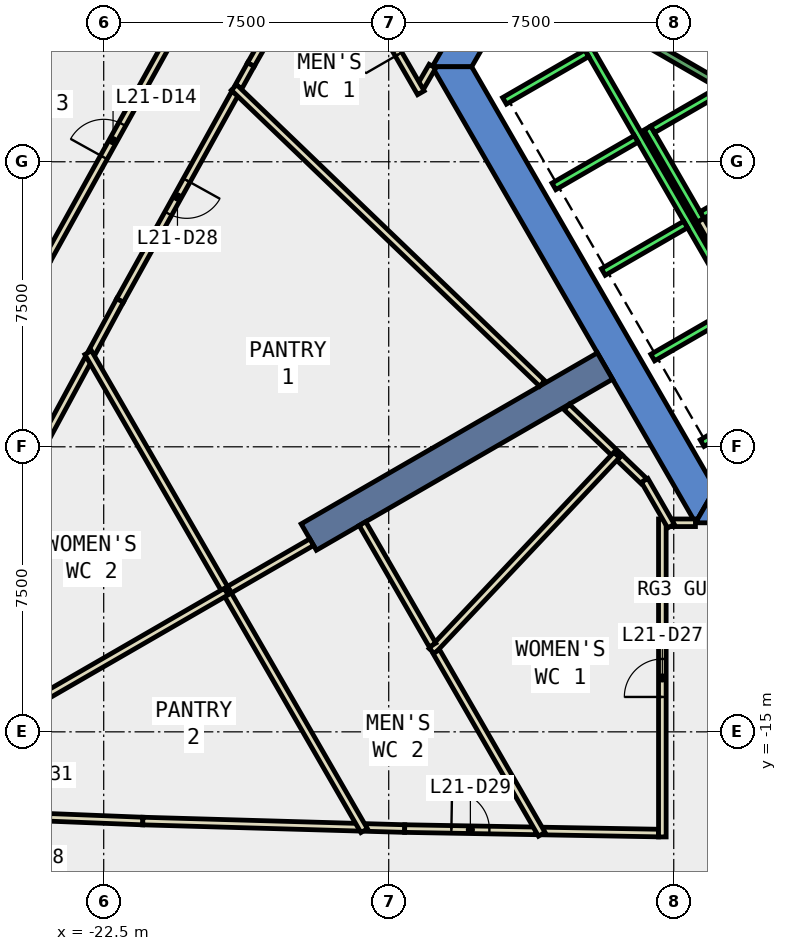
"""IFC4 building model, lengths in metres.
Left out: names, types, materials, properties, quantities, classifications, styles, units other than length and angle.
Written with IfcOpenShell. Run it as: python <this file> out.ifc"""

import sys

from ifc_helpers import new_model, si_unit, direction, frame, frame_2d, origin, place, context, subcontext, project, spatial, polyline, rectangle, outline, extrude, element, fill, save


model = new_model("IFC4")
c1 = context("Model", 3, precision=1e-05, world=origin(), true_north=direction((0.0, 1.0)))
c2 = subcontext(c1, "Body", "Model", "MODEL_VIEW")
j1 = project(units=[si_unit("LENGTHUNIT", "METRE"), si_unit("PLANEANGLEUNIT", "RADIAN")], contexts=[c1])
p1 = place(None, origin())
s1 = spatial("IfcSite", under=j1, at=p1, CompositionType="ELEMENT")
p2 = place(p1, origin())
s2 = spatial("IfcBuilding", under=s1, at=p2, CompositionType="ELEMENT")
p3 = place(p2, frame((0.0, 0.0, 99.2)))
s3 = spatial("IfcBuildingStorey", under=s2, at=p3, CompositionType="ELEMENT", Elevation=99.2)
p4 = place(p3, frame((0.0, 0.0, -0.4)))
e1 = element("IfcWall", 1, at=p4, inside=s3, PredefinedType="SHEAR", context=c2, shape_type="SweptSolid", body=[
    extrude(outline(polyline([(-12.488, 3.07), (-13.267, 3.52), (-13.856, 2.5), (-12.817, 2.5), (-12.488, 3.07)])), origin(), (0.0, 0.0, 1.0), 4.2),
])
p5 = place(p3, frame((0.0, 0.0, -0.4)))
e2 = element("IfcWall", 2, at=p5, inside=s3, PredefinedType="SHEAR", context=c2, shape_type="SweptSolid", body=[
    extrude(outline(polyline([(-13.856, 2.5), (-6.928, -9.5), (-6.409, -8.6), (-12.817, 2.5), (-13.856, 2.5)])), origin(), (0.0, 0.0, 1.0), 4.2),
])
p6 = place(p3, frame((0.0, 0.0, -0.4)))
e3 = element("IfcWall", 3, at=p6, inside=s3, PredefinedType="SHEAR", context=c2, shape_type="SweptSolid", body=[
    extrude(outline(polyline([(3.75, -9.5), (3.75, -8.6), (-6.409, -8.6), (-6.928, -9.5), (3.75, -9.5)])), origin(), (0.0, 0.0, 1.0), 4.2),
])
p7 = place(p3, frame((-9.31, -5.375, -0.4), z_axis=(0.0, 0.0, 1.0), x_axis=(-0.866017533419, -0.500013631625, 0.0)))
e4 = element("IfcWall", 4, at=p7, inside=s3, PredefinedType="SHEAR", context=c2, shape_type="SweptSolid", body=[
    extrude(rectangle(XDim=9.0, YDim=0.8, at=frame_2d((4.5, 0.0))), origin(), (0.0, 0.0, 1.0), 4.2),
])
p8 = place(p3, frame((-13.85, 2.514, 0.0), z_axis=(0.0, 0.0, 1.0), x_axis=(-0.500418219013, -0.865783810244, 0.0)))
e5 = element("IfcWall", 5, at=p8, inside=s3, PredefinedType="PARTITIONING", context=c2, shape_type="SweptSolid", body=[
    extrude(rectangle(XDim=0.607, YDim=0.2, at=frame_2d((0.304, 0.0))), origin(), (0.0, 0.0, 1.0), 3.8),
])
p9 = place(p3, frame((-14.154, 1.815, 0.0), z_axis=(0.0, 0.0, 1.0), x_axis=(-0.500038857296, 0.866002968352, 0.0)))
e6 = element("IfcWall", 6, at=p9, inside=s3, PredefinedType="PARTITIONING", context=c2, shape_type="SweptSolid", body=[
    extrude(rectangle(XDim=3.34, YDim=0.2, at=frame_2d((1.67, 0.0))), origin(), (0.0, 0.0, 1.0), 3.8),
])
p10 = place(p9, frame((1.17, 0.0, 0.0)))
e7 = element("IfcOpeningElement", 7, at=p10, cuts=e6, PredefinedType="OPENING", context=c2, shape_type="SweptSolid", body=[
    extrude(rectangle(XDim=1.0, YDim=2.1, at=frame_2d((0.5, 1.05))), frame((0.0, 0.11, 0.0), z_axis=(0.0, -1.0, 0.0), x_axis=(1.0, 0.0, 0.0)), (0.0, 0.0, 1.0), 0.22),
])
p11 = place(p3, frame((-16.986, 5.436, 0.0), z_axis=(0.0, 0.0, 1.0), x_axis=(-0.49514688151, -0.868809280412, 0.0)))
e8 = element("IfcWall", 8, at=p11, inside=s3, PredefinedType="PARTITIONING", context=c2, shape_type="SweptSolid", body=[
    extrude(rectangle(XDim=3.314, YDim=0.2, at=frame_2d((1.657, 0.0))), origin(), (0.0, 0.0, 1.0), 3.8),
])
p12 = place(p3, frame((-18.627, 2.557, 0.0), z_axis=(0.0, 0.0, 1.0), x_axis=(-0.484771582084, -0.874640790956, 0.0)))
e9 = element("IfcWall", 9, at=p12, inside=s3, PredefinedType="PARTITIONING", context=c2, shape_type="SweptSolid", body=[
    extrude(rectangle(XDim=0.666, YDim=0.2, at=frame_2d((0.333, 0.0))), origin(), (0.0, 0.0, 1.0), 3.8),
])
p13 = place(p3, frame((-10.923, -17.61, 0.0), z_axis=(0.0, 0.0, 1.0), x_axis=(0.999846489632, -0.017521334753, 0.0)))
e10 = element("IfcWall", 10, at=p13, inside=s3, PredefinedType="PARTITIONING", context=c2, shape_type="SweptSolid", body=[
    extrude(rectangle(XDim=3.024, YDim=0.2, at=frame_2d((1.512, 0.0))), origin(), (0.0, 0.0, 1.0), 3.8),
])
p14 = place(p3, frame((-19.047, 1.799, 0.0), z_axis=(0.0, 0.0, 1.0), x_axis=(-0.485240396382, -0.87438078531, 0.0)))
e11 = element("IfcWall", 11, at=p14, inside=s3, PredefinedType="PARTITIONING", context=c2, shape_type="SweptSolid", body=[
    extrude(rectangle(XDim=6.232, YDim=0.2, at=frame_2d((3.116, 0.0))), origin(), (0.0, 0.0, 1.0), 3.8),
])
p15 = place(p14, frame((2.616, 0.0, 0.0)))
e12 = element("IfcOpeningElement", 12, at=p15, cuts=e11, PredefinedType="OPENING", context=c2, shape_type="SweptSolid", body=[
    extrude(rectangle(XDim=1.0, YDim=2.1, at=frame_2d((0.5, 1.05))), frame((0.0, 0.11, 0.0), z_axis=(0.0, -1.0, 0.0), x_axis=(1.0, 0.0, 0.0)), (0.0, 0.0, 1.0), 0.22),
])
p16 = place(p3, frame((-22.071, -3.65, 0.0), z_axis=(0.0, 0.0, 1.0), x_axis=(-0.475212034938, -0.879871309823, 0.0)))
e13 = element("IfcWall", 13, at=p16, inside=s3, PredefinedType="PARTITIONING", context=c2, shape_type="SweptSolid", body=[
    extrude(rectangle(XDim=1.557, YDim=0.2, at=frame_2d((0.779, 0.0))), origin(), (0.0, 0.0, 1.0), 3.8),
])
p17 = place(p3, frame((-15.596, -17.516, 0.0), z_axis=(0.0, 0.0, 1.0), x_axis=(0.99959813819, -0.028347171427, 0.0)))
e14 = element("IfcWall", 14, at=p17, inside=s3, PredefinedType="PARTITIONING", context=c2, shape_type="SweptSolid", body=[
    extrude(rectangle(XDim=1.016, YDim=0.2, at=frame_2d((0.508, 0.0))), origin(), (0.0, 0.0, 1.0), 3.8),
])
p18 = place(p3, frame((-14.58, -17.545, 0.0), z_axis=(0.0, 0.0, 1.0), x_axis=(0.999844180431, -0.01765261618, 0.0)))
e15 = element("IfcWall", 15, at=p18, inside=s3, PredefinedType="PARTITIONING", context=c2, shape_type="SweptSolid", body=[
    extrude(rectangle(XDim=3.458, YDim=0.2, at=frame_2d((1.729, 0.0))), origin(), (0.0, 0.0, 1.0), 3.8),
])
p19 = place(p18, frame((1.229, 0.0, 0.0)))
e16 = element("IfcOpeningElement", 16, at=p19, cuts=e15, PredefinedType="OPENING", context=c2, shape_type="SweptSolid", body=[
    extrude(rectangle(XDim=1.0, YDim=2.1, at=frame_2d((0.5, 1.05))), frame((0.0, 0.11, 0.0), z_axis=(0.0, -1.0, 0.0), x_axis=(1.0, 0.0, 0.0)), (0.0, 0.0, 1.0), 0.22),
])
p20 = place(p3, frame((-22.906, -5.196, 0.0), z_axis=(0.0, 0.0, 1.0), x_axis=(-0.475448213767, -0.879743710421, 0.0)))
e17 = element("IfcWall", 17, at=p20, inside=s3, PredefinedType="PARTITIONING", context=c2, shape_type="SweptSolid", body=[
    extrude(rectangle(XDim=5.343, YDim=0.2, at=frame_2d((2.671, 0.0))), origin(), (0.0, 0.0, 1.0), 3.8),
])
p21 = place(p3, frame((-27.307, -17.116, 0.0), z_axis=(0.0, 0.0, 1.0), x_axis=(0.999217829656, -0.039544012168, 0.0)))
e18 = element("IfcWall", 18, at=p21, inside=s3, PredefinedType="PARTITIONING", context=c2, shape_type="SweptSolid", body=[
    extrude(rectangle(XDim=5.841, YDim=0.2, at=frame_2d((2.92, 0.0))), origin(), (0.0, 0.0, 1.0), 3.8),
])
p22 = place(p21, frame((2.42, 0.0, 0.0)))
e19 = element("IfcOpeningElement", 19, at=p22, cuts=e18, PredefinedType="OPENING", context=c2, shape_type="SweptSolid", body=[
    extrude(rectangle(XDim=1.0, YDim=2.1, at=frame_2d((0.5, 1.05))), frame((0.0, 0.11, 0.0), z_axis=(0.0, -1.0, 0.0), x_axis=(1.0, 0.0, 0.0)), (0.0, 0.0, 1.0), 0.22),
])
p23 = place(p3, frame((-21.471, -17.347, 0.0), z_axis=(0.0, 0.0, 1.0), x_axis=(0.999587337564, -0.028725504044, 0.0)))
e20 = element("IfcWall", 20, at=p23, inside=s3, PredefinedType="PARTITIONING", context=c2, shape_type="SweptSolid", body=[
    extrude(rectangle(XDim=5.677, YDim=0.2, at=frame_2d((2.839, 0.0))), origin(), (0.0, 0.0, 1.0), 3.8),
])
p24 = place(p3, frame((-24.0, -2.593, 0.0), z_axis=(0.0, 0.0, 1.0), x_axis=(0.485148833338, 0.874431592242, 0.0)))
e21 = element("IfcWall", 21, at=p24, inside=s3, PredefinedType="PARTITIONING", context=c2, shape_type="SweptSolid", body=[
    extrude(rectangle(XDim=7.049, YDim=0.2, at=frame_2d((3.525, 0.0))), origin(), (0.0, 0.0, 1.0), 3.8),
])
p25 = place(p24, frame((3.099, 0.0, 0.0)))
e22 = element("IfcOpeningElement", 22, at=p25, cuts=e21, PredefinedType="OPENING", context=c2, shape_type="SweptSolid", body=[
    extrude(rectangle(XDim=1.0, YDim=2.1, at=frame_2d((0.5, 1.05))), frame((0.0, 0.11, 0.0), z_axis=(0.0, -1.0, 0.0), x_axis=(1.0, 0.0, 0.0)), (0.0, 0.0, 1.0), 0.22),
])
p26 = place(p3, frame((-5.492, -3.788, 0.0), z_axis=(0.0, 0.0, 1.0), x_axis=(-0.500008949224, 0.866020236886, 0.0)))
e23 = element("IfcWall", 23, at=p26, inside=s3, PredefinedType="PARTITIONING", context=c2, shape_type="SweptSolid", body=[
    extrude(rectangle(XDim=2.68, YDim=0.2, at=frame_2d((1.34, 0.0))), origin(), (0.0, 0.0, 1.0), 3.8),
])
p27 = place(p3, frame((-7.522, -9.499, 0.0), z_axis=(0.0, 0.0, 1.0), x_axis=(1.0, 0.0, 0.0)))
e24 = element("IfcWall", 24, at=p27, inside=s3, PredefinedType="PARTITIONING", context=c2, shape_type="SweptSolid", body=[
    extrude(rectangle(XDim=0.593, YDim=0.2, at=frame_2d((0.296, 0.0))), origin(), (0.0, 0.0, 1.0), 3.8),
])
p28 = place(p3, frame((-7.8, -17.765, 0.0), z_axis=(0.0, 0.0, 1.0), x_axis=(0.0, 1.0, 0.0)))
e25 = element("IfcWall", 25, at=p28, inside=s3, PredefinedType="PARTITIONING", context=c2, shape_type="SweptSolid", body=[
    extrude(rectangle(XDim=8.366, YDim=0.2, at=frame_2d((4.183, 0.0))), origin(), (0.0, 0.0, 1.0), 3.8),
])
p29 = place(p28, frame((3.683, 0.0, 0.0)))
e26 = element("IfcOpeningElement", 26, at=p29, cuts=e25, PredefinedType="OPENING", context=c2, shape_type="SweptSolid", body=[
    extrude(rectangle(XDim=1.0, YDim=2.1, at=frame_2d((0.5, 1.05))), frame((0.0, 0.11, 0.0), z_axis=(0.0, -1.0, 0.0), x_axis=(1.0, 0.0, 0.0)), (0.0, 0.0, 1.0), 0.22),
])
p30 = place(p3, frame((-8.93, -7.783, 0.0), z_axis=(0.0, 0.0, 1.0), x_axis=(0.720954255291, -0.692982656189, 0.0)))
e27 = element("IfcWall", 27, at=p30, inside=s3, PredefinedType="PARTITIONING", context=c2, shape_type="SweptSolid", body=[
    extrude(rectangle(XDim=0.89, YDim=0.2, at=frame_2d((0.445, 0.0))), origin(), (0.0, 0.0, 1.0), 3.8),
])
p31 = place(p3, frame((-7.572, -9.586, 0.0), z_axis=(0.0, 0.0, 1.0), x_axis=(-0.499484152563, 0.866323023669, 0.0)))
e28 = element("IfcWall", 28, at=p31, inside=s3, PredefinedType="PARTITIONING", context=c2, shape_type="SweptSolid", body=[
    extrude(rectangle(XDim=1.39, YDim=0.2, at=frame_2d((0.695, 0.0))), origin(), (0.0, 0.0, 1.0), 3.8),
])
p32 = place(p3, frame((-8.93, -7.783, 0.0), z_axis=(0.0, 0.0, 1.0), x_axis=(-0.72124523191, 0.692679807305, 0.0)))
e29 = element("IfcWall", 29, at=p32, inside=s3, PredefinedType="PARTITIONING", context=c2, shape_type="SweptSolid", body=[
    extrude(rectangle(XDim=1.923, YDim=0.2, at=frame_2d((0.961, 0.0))), origin(), (0.0, 0.0, 1.0), 3.8),
])
p33 = place(p3, frame((-13.865, -12.876, 0.0), z_axis=(0.0, 0.0, 1.0), x_axis=(0.685651384846, 0.727930064263, 0.0)))
e30 = element("IfcWall", 30, at=p33, inside=s3, PredefinedType="PARTITIONING", context=c2, shape_type="SweptSolid", body=[
    extrude(rectangle(XDim=7.091, YDim=0.2, at=frame_2d((3.545, 0.0))), origin(), (0.0, 0.0, 1.0), 3.8),
])
p34 = place(p3, frame((-10.973, -17.695, 0.0), z_axis=(0.0, 0.0, 1.0), x_axis=(-0.499986535608, 0.866033177315, 0.0)))
e31 = element("IfcWall", 31, at=p34, inside=s3, PredefinedType="PARTITIONING", context=c2, shape_type="SweptSolid", body=[
    extrude(rectangle(XDim=5.549, YDim=0.2, at=frame_2d((2.774, 0.0))), origin(), (0.0, 0.0, 1.0), 3.8),
])
p35 = place(p3, frame((-13.847, -12.716, 0.0), z_axis=(0.0, 0.0, 1.0), x_axis=(-0.499861859587, 0.866105144501, 0.0)))
e32 = element("IfcWall", 32, at=p35, inside=s3, PredefinedType="PARTITIONING", context=c2, shape_type="SweptSolid", body=[
    extrude(rectangle(XDim=3.689, YDim=0.2, at=frame_2d((1.844, 0.0))), origin(), (0.0, 0.0, 1.0), 3.8),
])
p36 = place(p3, frame((-17.027, -10.009, 0.0), z_axis=(0.0, 0.0, 1.0), x_axis=(-0.865950948929, -0.500128937424, 0.0)))
e33 = element("IfcWall", 33, at=p36, inside=s3, PredefinedType="PARTITIONING", context=c2, shape_type="SweptSolid", body=[
    extrude(rectangle(XDim=2.599, YDim=0.2, at=frame_2d((1.3, 0.0))), origin(), (0.0, 0.0, 1.0), 3.8),
])
p37 = place(p3, frame((-19.278, -11.309, 0.0), z_axis=(0.0, 0.0, 1.0), x_axis=(-0.500044545065, 0.865999684151, 0.0)))
e34 = element("IfcWall", 34, at=p37, inside=s3, PredefinedType="PARTITIONING", context=c2, shape_type="SweptSolid", body=[
    extrude(rectangle(XDim=7.261, YDim=0.2, at=frame_2d((3.63, 0.0))), origin(), (0.0, 0.0, 1.0), 3.8),
])
p38 = place(p3, frame((-15.646, -17.6, 0.0), z_axis=(0.0, 0.0, 1.0), x_axis=(-0.499953299825, 0.866052364464, 0.0)))
e35 = element("IfcWall", 35, at=p38, inside=s3, PredefinedType="PARTITIONING", context=c2, shape_type="SweptSolid", body=[
    extrude(rectangle(XDim=7.263, YDim=0.2, at=frame_2d((3.631, 0.0))), origin(), (0.0, 0.0, 1.0), 3.8),
])
p39 = place(p3, frame((-19.277, -11.311, 0.0), z_axis=(0.0, 0.0, 1.0), x_axis=(-0.866078939042, -0.499907262747, 0.0)))
e36 = element("IfcWall", 36, at=p39, inside=s3, PredefinedType="PARTITIONING", context=c2, shape_type="SweptSolid", body=[
    extrude(rectangle(XDim=10.864, YDim=0.2, at=frame_2d((5.432, 0.0))), origin(), (0.0, 0.0, 1.0), 3.8),
])
p40 = place(p3, frame((-10.96, -5.834, 0.0), z_axis=(0.0, 0.0, 1.0), x_axis=(-0.721236335428, 0.692689070549, 0.0)))
e37 = element("IfcWall", 37, at=p40, inside=s3, PredefinedType="PARTITIONING", context=c2, shape_type="SweptSolid", body=[
    extrude(rectangle(XDim=11.246, YDim=0.2, at=frame_2d((5.623, 0.0))), origin(), (0.0, 0.0, 1.0), 3.8),
])
p41 = place(p3, frame((-8.192, 0.888, 0.0), z_axis=(0.0, 0.0, 1.0), x_axis=(0.49994636267, -0.866056369097, 0.0)))
e38 = element("IfcWall", 38, at=p41, inside=s3, PredefinedType="STANDARD", context=c2, shape_type="SweptSolid", body=[
    extrude(rectangle(XDim=2.8, YDim=0.2, at=frame_2d((1.4, 0.0))), origin(), (0.0, 0.0, 1.0), 3.8),
])
for number, where, z_axis, x_axis in (
    (39, (-5.977, 2.052, 0.0), (0.0, 0.0, 1.0), (-0.866, -0.5, 0.0)),
    (40, (-4.677, -0.2, 0.0), (0.0, 0.0, 1.0), (-0.866, -0.5, 0.0)),
):
    element("IfcWall", number, at=place(p3, frame(where, z_axis=z_axis, x_axis=x_axis)), inside=s3, PredefinedType="STANDARD", context=c2, shape_type="SweptSolid", body=[
        extrude(rectangle(XDim=2.399, YDim=0.2, at=frame_2d((1.2, 0.0))), origin(), (0.0, 0.0, 1.0), 3.8),
    ])
p42 = place(p3, frame((-9.751, 2.99, 0.0), z_axis=(0.0, 0.0, 1.0), x_axis=(0.50000090737, -0.866024879913, 0.0)))
e41 = element("IfcWall", 41, at=p42, inside=s3, PredefinedType="STANDARD", context=c2, shape_type="SweptSolid", body=[
    extrude(rectangle(XDim=10.6, YDim=0.2, at=frame_2d((5.3, 0.0))), origin(), (0.0, 0.0, 1.0), 3.8),
])
p43 = place(p3, frame((-9.788, 2.853, 0.0), z_axis=(0.0, 0.0, 1.0), x_axis=(-0.865998541277, -0.500046524342, 0.0)))
e42 = element("IfcWall", 42, at=p43, inside=s3, PredefinedType="STANDARD", context=c2, shape_type="SweptSolid", body=[
    extrude(rectangle(XDim=2.5, YDim=0.2, at=frame_2d((1.25, 0.0))), origin(), (0.0, 0.0, 1.0), 3.8),
])
for number, where, z_axis, x_axis in (
    (43, (-8.488, 0.602, 0.0), (0.0, 0.0, 1.0), (-0.866, -0.5, 0.0)),
    (44, (-7.188, -1.65, 0.0), (0.0, 0.0, 1.0), (-0.866, -0.5, 0.0)),
    (45, (-5.888, -3.902, 0.0), (0.0, 0.0, 1.0), (-0.866, -0.5, 0.0)),
    (46, (-4.588, -6.153, 0.0), (0.0, 0.0, 1.0), (-0.866, -0.5, 0.0)),
):
    element("IfcWall", number, at=place(p3, frame(where, z_axis=z_axis, x_axis=x_axis)), inside=s3, PredefinedType="STANDARD", context=c2, shape_type="SweptSolid", body=[
        extrude(rectangle(XDim=2.5, YDim=0.2, at=frame_2d((1.25, 0.0))), origin(), (0.0, 0.0, 1.0), 3.8),
    ])
p44 = place(p3, frame((-6.25, 2.01, 0.0), z_axis=(0.0, 0.0, 1.0), x_axis=(-0.86611865017, 0.499838457731, 0.0)))
e47 = element("IfcWall", 47, at=p44, inside=s3, PredefinedType="STANDARD", context=c2, shape_type="SweptSolid", body=[
    extrude(rectangle(XDim=2.733, YDim=0.2, at=frame_2d((1.366, 0.0))), origin(), (0.0, 0.0, 1.0), 3.8),
])
p45 = place(p25, origin())
e48 = element("IfcDoor", 48, at=p45, inside=s3, OperationType="SINGLE_SWING_LEFT", PredefinedType="DOOR", context=c2, shape_type="SweptSolid", body=[
    extrude(rectangle(XDim=1.0, YDim=2.1, at=frame_2d((0.5, 1.05))), frame((0.0, 0.025, 0.0), z_axis=(0.0, -1.0, 0.0), x_axis=(1.0, 0.0, 0.0)), (0.0, 0.0, 1.0), 0.05),
])
fill(e22, e48)
p46 = place(p10, origin())
e49 = element("IfcDoor", 49, at=p46, inside=s3, OperationType="SINGLE_SWING_LEFT", PredefinedType="DOOR", context=c2, shape_type="SweptSolid", body=[
    extrude(rectangle(XDim=1.0, YDim=2.1, at=frame_2d((0.5, 1.05))), frame((0.0, 0.025, 0.0), z_axis=(0.0, -1.0, 0.0), x_axis=(1.0, 0.0, 0.0)), (0.0, 0.0, 1.0), 0.05),
])
fill(e7, e49)
p47 = place(p29, origin())
e50 = element("IfcDoor", 50, at=p47, inside=s3, OperationType="SINGLE_SWING_RIGHT", PredefinedType="DOOR", context=c2, shape_type="SweptSolid", body=[
    extrude(rectangle(XDim=1.0, YDim=2.1, at=frame_2d((0.5, 1.05))), frame((0.0, 0.025, 0.0), z_axis=(0.0, -1.0, 0.0), x_axis=(1.0, 0.0, 0.0)), (0.0, 0.0, 1.0), 0.05),
])
fill(e26, e50)
p48 = place(p15, origin())
e51 = element("IfcDoor", 51, at=p48, inside=s3, OperationType="SINGLE_SWING_LEFT", PredefinedType="DOOR", context=c2, shape_type="SweptSolid", body=[
    extrude(rectangle(XDim=1.0, YDim=2.1, at=frame_2d((0.5, 1.05))), frame((0.0, 0.025, 0.0), z_axis=(0.0, -1.0, 0.0), x_axis=(1.0, 0.0, 0.0)), (0.0, 0.0, 1.0), 0.05),
])
fill(e12, e51)
p49 = place(p19, origin())
e52 = element("IfcDoor", 52, at=p49, inside=s3, OperationType="SINGLE_SWING_LEFT", PredefinedType="DOOR", context=c2, shape_type="SweptSolid", body=[
    extrude(rectangle(XDim=1.0, YDim=2.1, at=frame_2d((0.5, 1.05))), frame((0.0, 0.025, 0.0), z_axis=(0.0, -1.0, 0.0), x_axis=(1.0, 0.0, 0.0)), (0.0, 0.0, 1.0), 0.05),
])
fill(e16, e52)
save(model, sys.argv[1])
